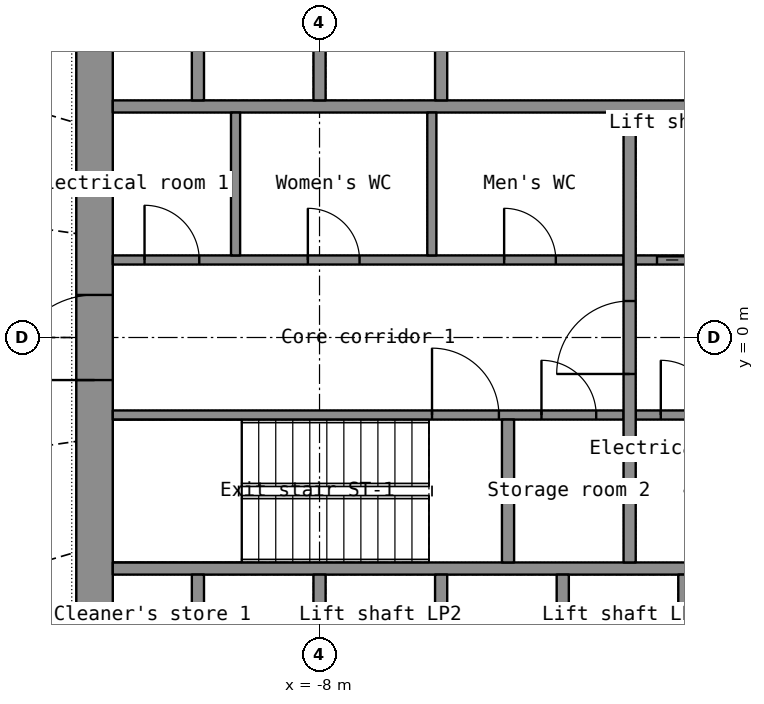
"""IFC4 building model, lengths in metres.
Left out: names, types, materials, properties, quantities, classifications, styles, units other than length and angle.
Written with IfcOpenShell. Run it as: python <this file> out.ifc"""

import sys

from ifc_helpers import new_model, si_unit, direction, frame, frame_2d, origin, place, context, subcontext, project, spatial, rectangle, extrude, element, fill, save


model = new_model("IFC4")
c1 = context("Model", 3, precision=1e-05, world=origin(), true_north=direction((0.0, 1.0)))
c2 = subcontext(c1, "Body", "Model", "MODEL_VIEW")
j1 = project(units=[si_unit("LENGTHUNIT", "METRE"), si_unit("PLANEANGLEUNIT", "RADIAN")], contexts=[c1])
p1 = place(None, origin())
s1 = spatial("IfcSite", under=j1, at=p1, CompositionType="ELEMENT")
p2 = place(p1, origin())
s2 = spatial("IfcBuilding", under=s1, at=p2, CompositionType="ELEMENT")
p3 = place(p2, frame((0.0, 0.0, 28.7)))
s3 = spatial("IfcBuildingStorey", under=s2, at=p3, CompositionType="ELEMENT", Elevation=28.7)
p4 = place(p3, frame((-11.7, -7.2, 0.0), z_axis=(0.0, 0.0, 1.0), x_axis=(0.0, 1.0, 0.0)))
e1 = element("IfcWall", 1, at=p4, inside=s3, PredefinedType="SHEAR", context=c2, shape_type="SweptSolid", body=[
    extrude(rectangle(XDim=14.4, YDim=0.6, at=frame_2d((7.2, 0.0))), origin(), (0.0, 0.0, 1.0), 3.8),
])
p5 = place(p4, frame((6.5, 0.0, 0.0)))
e2 = element("IfcOpeningElement", 2, at=p5, cuts=e1, PredefinedType="OPENING", context=c2, shape_type="SweptSolid", body=[
    extrude(rectangle(XDim=1.4, YDim=2.2, at=frame_2d((0.7, 1.1))), frame((0.0, 0.31, 0.0), z_axis=(0.0, -1.0, 0.0), x_axis=(1.0, 0.0, 0.0)), (0.0, 0.0, 1.0), 0.62),
])
for number, where, z_axis, x_axis in (
    (3, (-11.4, -3.8, 0.0), (0.0, 0.0, 1.0), (1.0, 0.0, 0.0)),
    (4, (-11.4, 3.8, 0.0), (0.0, 0.0, 1.0), (1.0, 0.0, 0.0)),
):
    element("IfcWall", number, at=place(p3, frame(where, z_axis=z_axis, x_axis=x_axis)), inside=s3, PredefinedType="SHEAR", context=c2, shape_type="SweptSolid", body=[
        extrude(rectangle(XDim=22.8, YDim=0.2, at=frame_2d((11.4, 0.0))), origin(), (0.0, 0.0, 1.0), 3.8),
    ])
for number, where, z_axis, x_axis in (
    (5, (-10.0, -6.6, 0.0), (0.0, 0.0, 1.0), (0.0, 1.0, 0.0)),
    (6, (-8.0, -6.6, 0.0), (0.0, 0.0, 1.0), (0.0, 1.0, 0.0)),
    (7, (-6.0, -6.6, 0.0), (0.0, 0.0, 1.0), (0.0, 1.0, 0.0)),
    (8, (-4.0, -6.6, 0.0), (0.0, 0.0, 1.0), (0.0, 1.0, 0.0)),
    (9, (-2.0, -6.6, 0.0), (0.0, 0.0, 1.0), (0.0, 1.0, 0.0)),
    (10, (-10.0, 3.9, 0.0), (0.0, 0.0, 1.0), (0.0, 1.0, 0.0)),
    (11, (-8.0, 3.9, 0.0), (0.0, 0.0, 1.0), (0.0, 1.0, 0.0)),
    (12, (-6.0, 3.9, 0.0), (0.0, 0.0, 1.0), (0.0, 1.0, 0.0)),
):
    element("IfcWall", number, at=place(p3, frame(where, z_axis=z_axis, x_axis=x_axis)), inside=s3, PredefinedType="SHEAR", context=c2, shape_type="SweptSolid", body=[
        extrude(rectangle(XDim=2.7, YDim=0.2, at=frame_2d((1.35, 0.0))), origin(), (0.0, 0.0, 1.0), 3.8),
    ])
p6 = place(p3, frame((-11.4, -1.275, 0.0), z_axis=(0.0, 0.0, 1.0), x_axis=(1.0, 0.0, 0.0)))
e13 = element("IfcWall", 13, at=p6, inside=s3, PredefinedType="SHEAR", context=c2, shape_type="SweptSolid", body=[
    extrude(rectangle(XDim=8.4, YDim=0.15, at=frame_2d((4.2, 0.0))), origin(), (0.0, 0.0, 1.0), 3.8),
])
p7 = place(p6, frame((5.25, 0.0, 0.0)))
e14 = element("IfcOpeningElement", 14, at=p7, cuts=e13, PredefinedType="OPENING", context=c2, shape_type="SweptSolid", body=[
    extrude(rectangle(XDim=1.1, YDim=2.15, at=frame_2d((0.55, 1.075))), frame((0.0, 0.085, 0.0), z_axis=(0.0, -1.0, 0.0), x_axis=(1.0, 0.0, 0.0)), (0.0, 0.0, 1.0), 0.17),
])
p8 = place(p6, frame((7.05, 0.0, 0.0)))
e15 = element("IfcOpeningElement", 15, at=p8, cuts=e13, PredefinedType="OPENING", context=c2, shape_type="SweptSolid", body=[
    extrude(rectangle(XDim=0.9, YDim=2.1, at=frame_2d((0.45, 1.05))), frame((0.0, 0.085, 0.0), z_axis=(0.0, -1.0, 0.0), x_axis=(1.0, 0.0, 0.0)), (0.0, 0.0, 1.0), 0.17),
])
p9 = place(p3, frame((-2.8, -1.275, 0.0), z_axis=(0.0, 0.0, 1.0), x_axis=(1.0, 0.0, 0.0)))
e16 = element("IfcWall", 16, at=p9, inside=s3, PredefinedType="SHEAR", context=c2, shape_type="SweptSolid", body=[
    extrude(rectangle(XDim=5.6, YDim=0.15, at=frame_2d((2.8, 0.0))), origin(), (0.0, 0.0, 1.0), 3.8),
])
p10 = place(p9, frame((4.15, 0.0, 0.0)))
e17 = element("IfcOpeningElement", 17, at=p10, cuts=e16, PredefinedType="OPENING", context=c2, shape_type="SweptSolid", body=[
    extrude(rectangle(XDim=1.1, YDim=2.2, at=frame_2d((0.55, 1.1))), frame((0.0, 0.085, 0.0), z_axis=(0.0, -1.0, 0.0), x_axis=(1.0, 0.0, 0.0)), (0.0, 0.0, 1.0), 0.17),
])
p11 = place(p9, frame((0.413, 0.0, 0.0)))
e18 = element("IfcOpeningElement", 18, at=p11, cuts=e16, PredefinedType="OPENING", context=c2, shape_type="SweptSolid", body=[
    extrude(rectangle(XDim=0.9, YDim=2.1, at=frame_2d((0.45, 1.05))), frame((0.0, 0.085, 0.0), z_axis=(0.0, -1.0, 0.0), x_axis=(1.0, 0.0, 0.0)), (0.0, 0.0, 1.0), 0.17),
])
p12 = place(p9, frame((2.288, 0.0, 0.0)))
e19 = element("IfcOpeningElement", 19, at=p12, cuts=e16, PredefinedType="OPENING", context=c2, shape_type="SweptSolid", body=[
    extrude(rectangle(XDim=0.9, YDim=2.1, at=frame_2d((0.45, 1.05))), frame((0.0, 0.085, 0.0), z_axis=(0.0, -1.0, 0.0), x_axis=(1.0, 0.0, 0.0)), (0.0, 0.0, 1.0), 0.17),
])
p13 = place(p3, frame((-11.4, 1.275, 0.0), z_axis=(0.0, 0.0, 1.0), x_axis=(1.0, 0.0, 0.0)))
e20 = element("IfcWall", 20, at=p13, inside=s3, PredefinedType="PARTITIONING", context=c2, shape_type="SweptSolid", body=[
    extrude(rectangle(XDim=8.4, YDim=0.15, at=frame_2d((4.2, 0.0))), origin(), (0.0, 0.0, 1.0), 3.8),
])
p14 = place(p13, frame((0.522, 0.0, 0.0)))
e21 = element("IfcOpeningElement", 21, at=p14, cuts=e20, PredefinedType="OPENING", context=c2, shape_type="SweptSolid", body=[
    extrude(rectangle(XDim=0.9, YDim=2.1, at=frame_2d((0.45, 1.05))), frame((0.0, 0.085, 0.0), z_axis=(0.0, -1.0, 0.0), x_axis=(1.0, 0.0, 0.0)), (0.0, 0.0, 1.0), 0.17),
])
p15 = place(p13, frame((3.208, 0.0, 0.0)))
e22 = element("IfcOpeningElement", 22, at=p15, cuts=e20, PredefinedType="OPENING", context=c2, shape_type="SweptSolid", body=[
    extrude(rectangle(XDim=0.85, YDim=2.1, at=frame_2d((0.425, 1.05))), frame((0.0, 0.085, 0.0), z_axis=(0.0, -1.0, 0.0), x_axis=(1.0, 0.0, 0.0)), (0.0, 0.0, 1.0), 0.17),
])
p16 = place(p13, frame((6.436, 0.0, 0.0)))
e23 = element("IfcOpeningElement", 23, at=p16, cuts=e20, PredefinedType="OPENING", context=c2, shape_type="SweptSolid", body=[
    extrude(rectangle(XDim=0.85, YDim=2.1, at=frame_2d((0.425, 1.05))), frame((0.0, 0.085, 0.0), z_axis=(0.0, -1.0, 0.0), x_axis=(1.0, 0.0, 0.0)), (0.0, 0.0, 1.0), 0.17),
])
p17 = place(p3, frame((-2.8, 1.275, 0.0), z_axis=(0.0, 0.0, 1.0), x_axis=(1.0, 0.0, 0.0)))
e24 = element("IfcWall", 24, at=p17, inside=s3, PredefinedType="SHEAR", context=c2, shape_type="SweptSolid", body=[
    extrude(rectangle(XDim=5.6, YDim=0.15, at=frame_2d((2.8, 0.0))), origin(), (0.0, 0.0, 1.0), 3.8),
])
p18 = place(p17, frame((0.35, 0.0, 0.0)))
e25 = element("IfcOpeningElement", 25, at=p18, cuts=e24, PredefinedType="OPENING", context=c2, shape_type="SweptSolid", body=[
    extrude(rectangle(XDim=1.1, YDim=2.2, at=frame_2d((0.55, 1.1))), frame((0.0, 0.085, 0.0), z_axis=(0.0, -1.0, 0.0), x_axis=(1.0, 0.0, 0.0)), (0.0, 0.0, 1.0), 0.17),
])
p19 = place(p17, frame((3.35, 0.0, 0.0)))
e26 = element("IfcOpeningElement", 26, at=p19, cuts=e24, PredefinedType="OPENING", context=c2, shape_type="SweptSolid", body=[
    extrude(rectangle(XDim=0.9, YDim=2.1, at=frame_2d((0.45, 1.05))), frame((0.0, 0.085, 0.0), z_axis=(0.0, -1.0, 0.0), x_axis=(1.0, 0.0, 0.0)), (0.0, 0.0, 1.0), 0.17),
])
p20 = place(p3, frame((-2.9, -3.7, 0.0), z_axis=(0.0, 0.0, 1.0), x_axis=(0.0, 1.0, 0.0)))
e27 = element("IfcWall", 27, at=p20, inside=s3, PredefinedType="SHEAR", context=c2, shape_type="SweptSolid", body=[
    extrude(rectangle(XDim=7.4, YDim=0.2, at=frame_2d((3.7, 0.0))), origin(), (0.0, 0.0, 1.0), 3.8),
])
p21 = place(p20, frame((3.1, 0.0, 0.0)))
e28 = element("IfcOpeningElement", 28, at=p21, cuts=e27, PredefinedType="OPENING", context=c2, shape_type="SweptSolid", body=[
    extrude(rectangle(XDim=1.2, YDim=2.2, at=frame_2d((0.6, 1.1))), frame((0.0, 0.11, 0.0), z_axis=(0.0, -1.0, 0.0), x_axis=(1.0, 0.0, 0.0)), (0.0, 0.0, 1.0), 0.22),
])
p22 = place(p3, frame((-4.9, -3.7, 0.0), z_axis=(0.0, 0.0, 1.0), x_axis=(0.0, 1.0, 0.0)))
e29 = element("IfcWall", 29, at=p22, inside=s3, PredefinedType="SHEAR", context=c2, shape_type="SweptSolid", body=[
    extrude(rectangle(XDim=2.35, YDim=0.2, at=frame_2d((1.175, 0.0))), origin(), (0.0, 0.0, 1.0), 3.8),
])
for number, where, z_axis, x_axis in (
    (30, (-9.381, 1.35, 0.0), (0.0, 0.0, 1.0), (0.0, 1.0, 0.0)),
    (31, (-6.153, 1.35, 0.0), (0.0, 0.0, 1.0), (0.0, 1.0, 0.0)),
):
    element("IfcWall", number, at=place(p3, frame(where, z_axis=z_axis, x_axis=x_axis)), inside=s3, PredefinedType="PARTITIONING", context=c2, shape_type="SweptSolid", body=[
        extrude(rectangle(XDim=2.35, YDim=0.15, at=frame_2d((1.175, 0.0))), origin(), (0.0, 0.0, 1.0), 3.8),
    ])
p23 = place(p5, origin())
e32 = element("IfcDoor", 32, at=p23, inside=s3, OperationType="DOUBLE_DOOR_SINGLE_SWING", PredefinedType="DOOR", context=c2, shape_type="SweptSolid", body=[
    extrude(rectangle(XDim=1.4, YDim=2.2, at=frame_2d((0.7, 1.1))), frame((0.0, 0.025, 0.0), z_axis=(0.0, -1.0, 0.0), x_axis=(1.0, 0.0, 0.0)), (0.0, 0.0, 1.0), 0.05),
])
fill(e2, e32)
p24 = place(p21, origin())
e33 = element("IfcDoor", 33, at=p24, inside=s3, OperationType="SINGLE_SWING_LEFT", PredefinedType="DOOR", context=c2, shape_type="SweptSolid", body=[
    extrude(rectangle(XDim=1.2, YDim=2.2, at=frame_2d((0.6, 1.1))), frame((0.0, 0.025, 0.0), z_axis=(0.0, -1.0, 0.0), x_axis=(1.0, 0.0, 0.0)), (0.0, 0.0, 1.0), 0.05),
])
fill(e28, e33)
p25 = place(p18, origin())
e34 = element("IfcDoor", 34, at=p25, inside=s3, OperationType="DOUBLE_DOOR_SLIDING", PredefinedType="DOOR", context=c2, shape_type="SweptSolid", body=[
    extrude(rectangle(XDim=1.1, YDim=2.2, at=frame_2d((0.55, 1.1))), frame((0.0, 0.025, 0.0), z_axis=(0.0, -1.0, 0.0), x_axis=(1.0, 0.0, 0.0)), (0.0, 0.0, 1.0), 0.05),
])
fill(e25, e34)
p26 = place(p7, origin())
e35 = element("IfcDoor", 35, at=p26, inside=s3, OperationType="SINGLE_SWING_LEFT", PredefinedType="DOOR", context=c2, shape_type="SweptSolid", body=[
    extrude(rectangle(XDim=1.1, YDim=2.15, at=frame_2d((0.55, 1.075))), frame((0.0, 0.025, 0.0), z_axis=(0.0, -1.0, 0.0), x_axis=(1.0, 0.0, 0.0)), (0.0, 0.0, 1.0), 0.05),
])
fill(e14, e35)
p27 = place(p14, origin())
e36 = element("IfcDoor", 36, at=p27, inside=s3, OperationType="SINGLE_SWING_LEFT", PredefinedType="DOOR", context=c2, shape_type="SweptSolid", body=[
    extrude(rectangle(XDim=0.9, YDim=2.1, at=frame_2d((0.45, 1.05))), frame((0.0, 0.025, 0.0), z_axis=(0.0, -1.0, 0.0), x_axis=(1.0, 0.0, 0.0)), (0.0, 0.0, 1.0), 0.05),
])
fill(e21, e36)
p28 = place(p15, origin())
e37 = element("IfcDoor", 37, at=p28, inside=s3, OperationType="SINGLE_SWING_LEFT", PredefinedType="DOOR", context=c2, shape_type="SweptSolid", body=[
    extrude(rectangle(XDim=0.85, YDim=2.1, at=frame_2d((0.425, 1.05))), frame((0.0, 0.025, 0.0), z_axis=(0.0, -1.0, 0.0), x_axis=(1.0, 0.0, 0.0)), (0.0, 0.0, 1.0), 0.05),
])
fill(e22, e37)
p29 = place(p16, origin())
e38 = element("IfcDoor", 38, at=p29, inside=s3, OperationType="SINGLE_SWING_LEFT", PredefinedType="DOOR", context=c2, shape_type="SweptSolid", body=[
    extrude(rectangle(XDim=0.85, YDim=2.1, at=frame_2d((0.425, 1.05))), frame((0.0, 0.025, 0.0), z_axis=(0.0, -1.0, 0.0), x_axis=(1.0, 0.0, 0.0)), (0.0, 0.0, 1.0), 0.05),
])
fill(e23, e38)
p30 = place(p11, origin())
e39 = element("IfcDoor", 39, at=p30, inside=s3, OperationType="SINGLE_SWING_LEFT", PredefinedType="DOOR", context=c2, shape_type="SweptSolid", body=[
    extrude(rectangle(XDim=0.9, YDim=2.1, at=frame_2d((0.45, 1.05))), frame((0.0, 0.025, 0.0), z_axis=(0.0, -1.0, 0.0), x_axis=(1.0, 0.0, 0.0)), (0.0, 0.0, 1.0), 0.05),
])
fill(e18, e39)
p31 = place(p8, origin())
e40 = element("IfcDoor", 40, at=p31, inside=s3, OperationType="SINGLE_SWING_LEFT", PredefinedType="DOOR", context=c2, shape_type="SweptSolid", body=[
    extrude(rectangle(XDim=0.9, YDim=2.1, at=frame_2d((0.45, 1.05))), frame((0.0, 0.025, 0.0), z_axis=(0.0, -1.0, 0.0), x_axis=(1.0, 0.0, 0.0)), (0.0, 0.0, 1.0), 0.05),
])
fill(e15, e40)
save(model, sys.argv[1])
